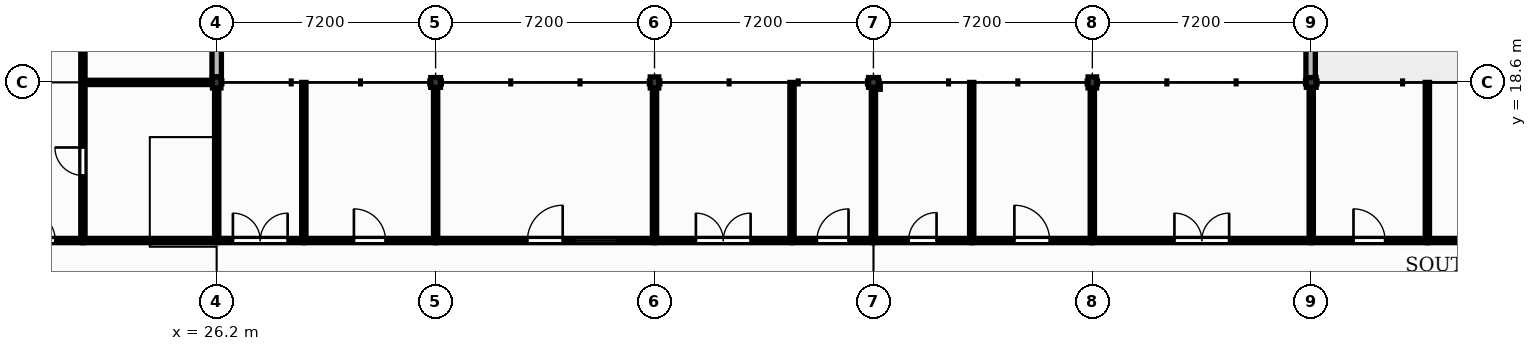
"""IFC4 building model, lengths in metres.
Left out: names, types, materials, properties, quantities, classifications, styles, units other than length and angle.
Written with IfcOpenShell. Run it as: python <this file> out.ifc"""

import sys

from ifc_helpers import new_model, si_unit, direction, frame, frame_2d, origin, origin_2d, place, context, subcontext, project, spatial, polyline, rectangle, outline, extrude, element, fill, save


model = new_model("IFC4")
c1 = context("Model", 3, precision=1e-05, world=origin(), true_north=direction((0.0, 1.0)))
c2 = subcontext(c1, "Body", "Model", "MODEL_VIEW")
j1 = project(units=[si_unit("LENGTHUNIT", "METRE"), si_unit("PLANEANGLEUNIT", "RADIAN")], contexts=[c1])
p1 = place(None, origin())
s1 = spatial("IfcSite", under=j1, at=p1, CompositionType="ELEMENT")
p2 = place(p1, origin())
s2 = spatial("IfcBuilding", under=s1, at=p2, CompositionType="ELEMENT")
p3 = place(p2, frame((0.0, 0.0, 9.0)))
s3 = spatial("IfcBuildingStorey", under=s2, at=p3, CompositionType="ELEMENT", Elevation=9.0)
p4 = place(p3, frame((26.2, 18.6, 0.0), z_axis=(0.0, 0.0, 1.0), x_axis=(1.0, 0.0, 0.0)))
e1 = element("IfcColumn", 1, at=p4, inside=s3, PredefinedType="COLUMN", context=c2, shape_type="SweptSolid", body=[
    extrude(rectangle(XDim=0.28, YDim=0.36, at=origin_2d()), origin(), (0.0, 0.0, 1.0), 3.95),
])
p5 = place(p3, frame((33.4, 18.6, 0.0), z_axis=(0.0, 0.0, 1.0), x_axis=(1.0, 0.0, 0.0)))
e2 = element("IfcColumn", 2, at=p5, inside=s3, PredefinedType="COLUMN", context=c2, shape_type="SweptSolid", body=[
    extrude(rectangle(XDim=0.32, YDim=0.32, at=origin_2d()), origin(), (0.0, 0.0, 1.0), 3.95),
])
p6 = place(p3, frame((40.6, 18.6, 0.0), z_axis=(0.0, 0.0, 1.0), x_axis=(1.0, 0.0, 0.0)))
e3 = element("IfcColumn", 3, at=p6, inside=s3, PredefinedType="COLUMN", context=c2, shape_type="SweptSolid", body=[
    extrude(rectangle(XDim=0.28, YDim=0.36, at=origin_2d()), origin(), (0.0, 0.0, 1.0), 3.95),
])
p7 = place(p3, frame((47.8, 18.6, 0.0), z_axis=(0.0, 0.0, 1.0), x_axis=(1.0, 0.0, 0.0)))
e4 = element("IfcColumn", 4, at=p7, inside=s3, PredefinedType="COLUMN", context=c2, shape_type="SweptSolid", body=[
    extrude(rectangle(XDim=0.32, YDim=0.32, at=origin_2d()), origin(), (0.0, 0.0, 1.0), 3.98),
])
p8 = place(p3, frame((55.0, 18.6, 0.0), z_axis=(0.0, 0.0, 1.0), x_axis=(1.0, 0.0, 0.0)))
e5 = element("IfcColumn", 5, at=p8, inside=s3, PredefinedType="COLUMN", context=c2, shape_type="SweptSolid", body=[
    extrude(rectangle(XDim=0.28, YDim=0.36, at=origin_2d()), origin(), (0.0, 0.0, 1.0), 3.99),
])
p9 = place(p3, frame((62.2, 18.6, 0.0), z_axis=(0.0, 0.0, 1.0), x_axis=(1.0, 0.0, 0.0)))
e6 = element("IfcColumn", 6, at=p9, inside=s3, PredefinedType="COLUMN", context=c2, shape_type="SweptSolid", body=[
    extrude(rectangle(XDim=0.32, YDim=0.32, at=origin_2d()), origin(), (0.0, 0.0, 1.0), 3.99),
])
p10 = place(p3, frame((26.2, 18.78, 0.0), z_axis=(0.0, 0.0, 1.0), x_axis=(0.0, 1.0, 0.0)))
e7 = element("IfcWall", 7, at=p10, inside=s3, PredefinedType="SOLIDWALL", context=c2, shape_type="SweptSolid", body=[
    extrude(rectangle(XDim=8.24, YDim=0.31, at=frame_2d((4.12, 0.0))), origin(), (0.0, 0.0, 1.0), 3.49),
])
p11 = place(p10, frame((0.915, 0.0, 1.0)))
e8 = element("IfcOpeningElement", 8, at=p11, cuts=e7, PredefinedType="OPENING", context=c2, shape_type="SweptSolid", body=[
    extrude(rectangle(XDim=1.24, YDim=1.8, at=frame_2d((0.62, 0.9))), frame((0.0, 0.165, 0.0), z_axis=(0.0, -1.0, 0.0), x_axis=(1.0, 0.0, 0.0)), (0.0, 0.0, 1.0), 0.33),
])
p12 = place(p10, frame((3.515, 0.0, 1.5)))
e9 = element("IfcOpeningElement", 9, at=p12, cuts=e7, PredefinedType="OPENING", context=c2, shape_type="SweptSolid", body=[
    extrude(rectangle(XDim=1.68, YDim=1.25, at=frame_2d((0.84, 0.625))), frame((0.0, 0.165, 0.0), z_axis=(0.0, -1.0, 0.0), x_axis=(1.0, 0.0, 0.0)), (0.0, 0.0, 1.0), 0.33),
])
p13 = place(p10, frame((5.875, 0.0, 1.5)))
e10 = element("IfcOpeningElement", 10, at=p13, cuts=e7, PredefinedType="OPENING", context=c2, shape_type="SweptSolid", body=[
    extrude(rectangle(XDim=1.68, YDim=1.25, at=frame_2d((0.84, 0.625))), frame((0.0, 0.165, 0.0), z_axis=(0.0, -1.0, 0.0), x_axis=(1.0, 0.0, 0.0)), (0.0, 0.0, 1.0), 0.33),
])
p14 = place(p3, frame((62.18, 18.6, 0.0), z_axis=(0.0, 0.0, 1.0), x_axis=(0.0, 1.0, 0.0)))
e11 = element("IfcWall", 11, at=p14, inside=s3, PredefinedType="SOLIDWALL", context=c2, shape_type="SweptSolid", body=[
    extrude(outline(polyline([(0.0, 0.0), (8.6, 0.0), (8.6, 0.05), (4.3, 2.16), (0.0, 0.05), (0.0, 0.0)])), frame((0.0, 0.155, 0.0), z_axis=(0.0, -1.0, 0.0), x_axis=(1.0, 0.0, 0.0)), (0.0, 0.0, 1.0), 0.31),
])
p15 = place(p3, frame((19.0, 13.4, 0.0), z_axis=(0.0, 0.0, 1.0), x_axis=(1.0, 0.0, 0.0)))
e12 = element("IfcWall", 12, at=p15, inside=s3, PredefinedType="PARTITIONING", context=c2, shape_type="SweptSolid", body=[
    extrude(rectangle(XDim=2.8, YDim=0.14, at=frame_2d((1.4, 0.0))), origin(), (0.0, 0.0, 1.0), 3.96),
])
p16 = place(p15, frame((0.91, 0.0, 0.0)))
e13 = element("IfcOpeningElement", 13, at=p16, cuts=e12, PredefinedType="OPENING", context=c2, shape_type="SweptSolid", body=[
    extrude(rectangle(XDim=0.98, YDim=2.15, at=frame_2d((0.49, 1.075))), frame((0.0, 0.08, 0.0), z_axis=(0.0, -1.0, 0.0), x_axis=(1.0, 0.0, 0.0)), (0.0, 0.0, 1.0), 0.16),
])
p17 = place(p3, frame((21.8, 13.47, 0.0), z_axis=(0.0, 0.0, 1.0), x_axis=(0.0, 1.0, 0.0)))
e14 = element("IfcWall", 14, at=p17, inside=s3, PredefinedType="PARTITIONING", context=c2, shape_type="SweptSolid", body=[
    extrude(rectangle(XDim=5.06, YDim=0.14, at=frame_2d((2.53, 0.0))), origin(), (0.0, 0.0, 1.0), 3.91),
])
p18 = place(p17, frame((2.07, 0.0, 0.0)))
e15 = element("IfcOpeningElement", 15, at=p18, cuts=e14, PredefinedType="OPENING", context=c2, shape_type="SweptSolid", body=[
    extrude(rectangle(XDim=0.92, YDim=2.1, at=frame_2d((0.46, 1.05))), frame((0.0, 0.08, 0.0), z_axis=(0.0, -1.0, 0.0), x_axis=(1.0, 0.0, 0.0)), (0.0, 0.0, 1.0), 0.16),
])
p19 = place(p3, frame((21.8, 13.4, 0.0), z_axis=(0.0, 0.0, 1.0), x_axis=(1.0, 0.0, 0.0)))
e16 = element("IfcWall", 16, at=p19, inside=s3, PredefinedType="PARTITIONING", context=c2, shape_type="SweptSolid", body=[
    extrude(rectangle(XDim=4.4, YDim=0.14, at=frame_2d((2.2, 0.0))), origin(), (0.0, 0.0, 1.0), 3.91),
])
p20 = place(p3, frame((21.8, 18.67, 0.0), z_axis=(0.0, 0.0, 1.0), x_axis=(0.0, 1.0, 0.0)))
e17 = element("IfcWall", 17, at=p20, inside=s3, PredefinedType="PARTITIONING", context=c2, shape_type="SweptSolid", body=[
    extrude(rectangle(XDim=2.99, YDim=0.14, at=frame_2d((1.495, 0.0))), origin(), (0.0, 0.0, 1.0), 3.96),
])
p21 = place(p20, frame((0.935, 0.0, 0.0)))
e18 = element("IfcOpeningElement", 18, at=p21, cuts=e17, PredefinedType="OPENING", context=c2, shape_type="SweptSolid", body=[
    extrude(rectangle(XDim=1.12, YDim=2.15, at=frame_2d((0.56, 1.075))), frame((0.0, 0.08, 0.0), z_axis=(0.0, -1.0, 0.0), x_axis=(1.0, 0.0, 0.0)), (0.0, 0.0, 1.0), 0.16),
])
p22 = place(p3, frame((21.8, 18.6, 0.0), z_axis=(0.0, 0.0, 1.0), x_axis=(1.0, 0.0, 0.0)))
e19 = element("IfcWall", 19, at=p22, inside=s3, PredefinedType="PARTITIONING", context=c2, shape_type="SweptSolid", body=[
    extrude(rectangle(XDim=4.26, YDim=0.14, at=frame_2d((2.13, 0.0))), origin(), (0.0, 0.0, 1.0), 3.49),
])
p23 = place(p3, frame((26.2, 13.47, 0.0), z_axis=(0.0, 0.0, 1.0), x_axis=(0.0, 1.0, 0.0)))
e20 = element("IfcWall", 20, at=p23, inside=s3, PredefinedType="PARTITIONING", context=c2, shape_type="SweptSolid", body=[
    extrude(rectangle(XDim=4.95, YDim=0.14, at=frame_2d((2.475, 0.0))), origin(), (0.0, 0.0, 1.0), 3.49),
])
p24 = place(p3, frame((26.2, 13.4, 0.0), z_axis=(0.0, 0.0, 1.0), x_axis=(1.0, 0.0, 0.0)))
e21 = element("IfcWall", 21, at=p24, inside=s3, PredefinedType="PARTITIONING", context=c2, shape_type="SweptSolid", body=[
    extrude(rectangle(XDim=2.866, YDim=0.14, at=frame_2d((1.433, 0.0))), origin(), (0.0, 0.0, 1.0), 3.91),
])
p25 = place(p24, frame((0.533, 0.0, 0.0)))
e22 = element("IfcOpeningElement", 22, at=p25, cuts=e21, PredefinedType="OPENING", context=c2, shape_type="SweptSolid", body=[
    extrude(rectangle(XDim=1.8, YDim=2.3, at=frame_2d((0.9, 1.15))), frame((0.0, 0.08, 0.0), z_axis=(0.0, -1.0, 0.0), x_axis=(1.0, 0.0, 0.0)), (0.0, 0.0, 1.0), 0.16),
])
p26 = place(p3, frame((29.066, 13.47, 0.0), z_axis=(0.0, 0.0, 1.0), x_axis=(0.0, 1.0, 0.0)))
e23 = element("IfcWall", 23, at=p26, inside=s3, PredefinedType="PARTITIONING", context=c2, shape_type="SweptSolid", body=[
    extrude(rectangle(XDim=5.13, YDim=0.14, at=frame_2d((2.565, 0.0))), origin(), (0.0, 0.0, 1.0), 3.91),
])
p27 = place(p3, frame((29.066, 13.4, 0.0), z_axis=(0.0, 0.0, 1.0), x_axis=(1.0, 0.0, 0.0)))
e24 = element("IfcWall", 24, at=p27, inside=s3, PredefinedType="PARTITIONING", context=c2, shape_type="SweptSolid", body=[
    extrude(rectangle(XDim=4.334, YDim=0.14, at=frame_2d((2.167, 0.0))), origin(), (0.0, 0.0, 1.0), 3.91),
])
p28 = place(p27, frame((1.647, 0.0, 0.0)))
e25 = element("IfcOpeningElement", 25, at=p28, cuts=e24, PredefinedType="OPENING", context=c2, shape_type="SweptSolid", body=[
    extrude(rectangle(XDim=1.04, YDim=2.1, at=frame_2d((0.52, 1.05))), frame((0.0, 0.08, 0.0), z_axis=(0.0, -1.0, 0.0), x_axis=(1.0, 0.0, 0.0)), (0.0, 0.0, 1.0), 0.16),
])
p29 = place(p3, frame((33.4, 13.47, 0.0), z_axis=(0.0, 0.0, 1.0), x_axis=(0.0, 1.0, 0.0)))
e26 = element("IfcWall", 26, at=p29, inside=s3, PredefinedType="PARTITIONING", context=c2, shape_type="SweptSolid", body=[
    extrude(rectangle(XDim=4.97, YDim=0.14, at=frame_2d((2.485, 0.0))), origin(), (0.0, 0.0, 1.0), 3.49),
])
p30 = place(p3, frame((33.4, 13.4, 0.0), z_axis=(0.0, 0.0, 1.0), x_axis=(1.0, 0.0, 0.0)))
e27 = element("IfcWall", 27, at=p30, inside=s3, PredefinedType="PARTITIONING", context=c2, shape_type="SweptSolid", body=[
    extrude(rectangle(XDim=7.2, YDim=0.14, at=frame_2d((3.6, 0.0))), origin(), (0.0, 0.0, 1.0), 3.91),
])
p31 = place(p30, frame((3.02, 0.0, 0.0)))
e28 = element("IfcOpeningElement", 28, at=p31, cuts=e27, PredefinedType="OPENING", context=c2, shape_type="SweptSolid", body=[
    extrude(rectangle(XDim=1.16, YDim=2.1, at=frame_2d((0.58, 1.05))), frame((0.0, 0.08, 0.0), z_axis=(0.0, -1.0, 0.0), x_axis=(1.0, 0.0, 0.0)), (0.0, 0.0, 1.0), 0.16),
])
p32 = place(p30, frame((4.58, 0.0, 1.05)))
e29 = element("IfcOpeningElement", 29, at=p32, cuts=e27, PredefinedType="OPENING", context=c2, shape_type="SweptSolid", body=[
    extrude(rectangle(XDim=1.4, YDim=1.1, at=frame_2d((0.7, 0.55))), frame((0.0, 0.08, 0.0), z_axis=(0.0, -1.0, 0.0), x_axis=(1.0, 0.0, 0.0)), (0.0, 0.0, 1.0), 0.16),
])
p33 = place(p3, frame((40.6, 13.47, 0.0), z_axis=(0.0, 0.0, 1.0), x_axis=(0.0, 1.0, 0.0)))
e30 = element("IfcWall", 30, at=p33, inside=s3, PredefinedType="PARTITIONING", context=c2, shape_type="SweptSolid", body=[
    extrude(rectangle(XDim=4.95, YDim=0.14, at=frame_2d((2.475, 0.0))), origin(), (0.0, 0.0, 1.0), 3.49),
])
p34 = place(p3, frame((40.6, 13.4, 0.0), z_axis=(0.0, 0.0, 1.0), x_axis=(1.0, 0.0, 0.0)))
e31 = element("IfcWall", 31, at=p34, inside=s3, PredefinedType="PARTITIONING", context=c2, shape_type="SweptSolid", body=[
    extrude(rectangle(XDim=4.522, YDim=0.14, at=frame_2d((2.261, 0.0))), origin(), (0.0, 0.0, 1.0), 3.91),
])
p35 = place(p34, frame((1.361, 0.0, 0.0)))
e32 = element("IfcOpeningElement", 32, at=p35, cuts=e31, PredefinedType="OPENING", context=c2, shape_type="SweptSolid", body=[
    extrude(rectangle(XDim=1.8, YDim=2.3, at=frame_2d((0.9, 1.15))), frame((0.0, 0.08, 0.0), z_axis=(0.0, -1.0, 0.0), x_axis=(1.0, 0.0, 0.0)), (0.0, 0.0, 1.0), 0.16),
])
p36 = place(p3, frame((45.122, 13.47, 0.0), z_axis=(0.0, 0.0, 1.0), x_axis=(0.0, 1.0, 0.0)))
e33 = element("IfcWall", 33, at=p36, inside=s3, PredefinedType="PARTITIONING", context=c2, shape_type="SweptSolid", body=[
    extrude(rectangle(XDim=5.13, YDim=0.14, at=frame_2d((2.565, 0.0))), origin(), (0.0, 0.0, 1.0), 3.91),
])
p37 = place(p3, frame((45.122, 13.4, 0.0), z_axis=(0.0, 0.0, 1.0), x_axis=(1.0, 0.0, 0.0)))
e34 = element("IfcWall", 34, at=p37, inside=s3, PredefinedType="PARTITIONING", context=c2, shape_type="SweptSolid", body=[
    extrude(rectangle(XDim=2.678, YDim=0.14, at=frame_2d((1.339, 0.0))), origin(), (0.0, 0.0, 1.0), 3.91),
])
p38 = place(p37, frame((0.819, 0.0, 0.0)))
e35 = element("IfcOpeningElement", 35, at=p38, cuts=e34, PredefinedType="OPENING", context=c2, shape_type="SweptSolid", body=[
    extrude(rectangle(XDim=1.04, YDim=2.1, at=frame_2d((0.52, 1.05))), frame((0.0, 0.08, 0.0), z_axis=(0.0, -1.0, 0.0), x_axis=(1.0, 0.0, 0.0)), (0.0, 0.0, 1.0), 0.16),
])
p39 = place(p3, frame((47.8, 13.47, 0.0), z_axis=(0.0, 0.0, 1.0), x_axis=(0.0, 1.0, 0.0)))
e36 = element("IfcWall", 36, at=p39, inside=s3, PredefinedType="PARTITIONING", context=c2, shape_type="SweptSolid", body=[
    extrude(rectangle(XDim=4.97, YDim=0.14, at=frame_2d((2.485, 0.0))), origin(), (0.0, 0.0, 1.0), 3.52),
])
p40 = place(p3, frame((47.8, 13.4, 0.0), z_axis=(0.0, 0.0, 1.0), x_axis=(1.0, 0.0, 0.0)))
e37 = element("IfcWall", 37, at=p40, inside=s3, PredefinedType="PARTITIONING", context=c2, shape_type="SweptSolid", body=[
    extrude(rectangle(XDim=3.233, YDim=0.14, at=frame_2d((1.616, 0.0))), origin(), (0.0, 0.0, 1.0), 3.96),
])
p41 = place(p40, frame((1.156, 0.0, 0.0)))
e38 = element("IfcOpeningElement", 38, at=p41, cuts=e37, PredefinedType="OPENING", context=c2, shape_type="SweptSolid", body=[
    extrude(rectangle(XDim=0.92, YDim=2.1, at=frame_2d((0.46, 1.05))), frame((0.0, 0.08, 0.0), z_axis=(0.0, -1.0, 0.0), x_axis=(1.0, 0.0, 0.0)), (0.0, 0.0, 1.0), 0.16),
])
p42 = place(p3, frame((51.033, 13.47, 0.0), z_axis=(0.0, 0.0, 1.0), x_axis=(0.0, 1.0, 0.0)))
e39 = element("IfcWall", 39, at=p42, inside=s3, PredefinedType="PARTITIONING", context=c2, shape_type="SweptSolid", body=[
    extrude(rectangle(XDim=5.13, YDim=0.14, at=frame_2d((2.565, 0.0))), origin(), (0.0, 0.0, 1.0), 3.96),
])
p43 = place(p3, frame((51.033, 13.4, 0.0), z_axis=(0.0, 0.0, 1.0), x_axis=(1.0, 0.0, 0.0)))
e40 = element("IfcWall", 40, at=p43, inside=s3, PredefinedType="PARTITIONING", context=c2, shape_type="SweptSolid", body=[
    extrude(rectangle(XDim=3.967, YDim=0.14, at=frame_2d((1.983, 0.0))), origin(), (0.0, 0.0, 1.0), 3.96),
])
p44 = place(p43, frame((1.404, 0.0, 0.0)))
e41 = element("IfcOpeningElement", 41, at=p44, cuts=e40, PredefinedType="OPENING", context=c2, shape_type="SweptSolid", body=[
    extrude(rectangle(XDim=1.16, YDim=2.1, at=frame_2d((0.58, 1.05))), frame((0.0, 0.08, 0.0), z_axis=(0.0, -1.0, 0.0), x_axis=(1.0, 0.0, 0.0)), (0.0, 0.0, 1.0), 0.16),
])
p45 = place(p3, frame((55.0, 13.47, 0.0), z_axis=(0.0, 0.0, 1.0), x_axis=(0.0, 1.0, 0.0)))
e42 = element("IfcWall", 42, at=p45, inside=s3, PredefinedType="PARTITIONING", context=c2, shape_type="SweptSolid", body=[
    extrude(rectangle(XDim=4.95, YDim=0.14, at=frame_2d((2.475, 0.0))), origin(), (0.0, 0.0, 1.0), 3.47),
])
p46 = place(p3, frame((55.0, 13.4, 0.0), z_axis=(0.0, 0.0, 1.0), x_axis=(1.0, 0.0, 0.0)))
e43 = element("IfcWall", 43, at=p46, inside=s3, PredefinedType="PARTITIONING", context=c2, shape_type="SweptSolid", body=[
    extrude(rectangle(XDim=7.2, YDim=0.14, at=frame_2d((3.6, 0.0))), origin(), (0.0, 0.0, 1.0), 3.96),
])
p47 = place(p46, frame((2.7, 0.0, 0.0)))
e44 = element("IfcOpeningElement", 44, at=p47, cuts=e43, PredefinedType="OPENING", context=c2, shape_type="SweptSolid", body=[
    extrude(rectangle(XDim=1.8, YDim=2.3, at=frame_2d((0.9, 1.15))), frame((0.0, 0.08, 0.0), z_axis=(0.0, -1.0, 0.0), x_axis=(1.0, 0.0, 0.0)), (0.0, 0.0, 1.0), 0.16),
])
p48 = place(p3, frame((62.2, 13.47, 0.0), z_axis=(0.0, 0.0, 1.0), x_axis=(0.0, 1.0, 0.0)))
e45 = element("IfcWall", 45, at=p48, inside=s3, PredefinedType="PARTITIONING", context=c2, shape_type="SweptSolid", body=[
    extrude(rectangle(XDim=4.97, YDim=0.14, at=frame_2d((2.485, 0.0))), origin(), (0.0, 0.0, 1.0), 3.47),
])
p49 = place(p3, frame((62.2, 13.4, 0.0), z_axis=(0.0, 0.0, 1.0), x_axis=(1.0, 0.0, 0.0)))
e46 = element("IfcWall", 46, at=p49, inside=s3, PredefinedType="PARTITIONING", context=c2, shape_type="SweptSolid", body=[
    extrude(rectangle(XDim=3.819, YDim=0.14, at=frame_2d((1.91, 0.0))), origin(), (0.0, 0.0, 1.0), 3.96),
])
p50 = place(p49, frame((1.389, 0.0, 0.0)))
e47 = element("IfcOpeningElement", 47, at=p50, cuts=e46, PredefinedType="OPENING", context=c2, shape_type="SweptSolid", body=[
    extrude(rectangle(XDim=1.04, YDim=2.1, at=frame_2d((0.52, 1.05))), frame((0.0, 0.08, 0.0), z_axis=(0.0, -1.0, 0.0), x_axis=(1.0, 0.0, 0.0)), (0.0, 0.0, 1.0), 0.16),
])
p51 = place(p3, frame((66.019, 13.47, 0.0), z_axis=(0.0, 0.0, 1.0), x_axis=(0.0, 1.0, 0.0)))
e48 = element("IfcWall", 48, at=p51, inside=s3, PredefinedType="PARTITIONING", context=c2, shape_type="SweptSolid", body=[
    extrude(rectangle(XDim=5.13, YDim=0.14, at=frame_2d((2.565, 0.0))), origin(), (0.0, 0.0, 1.0), 3.96),
])
p52 = place(p3, frame((66.019, 13.4, 0.0), z_axis=(0.0, 0.0, 1.0), x_axis=(1.0, 0.0, 0.0)))
e49 = element("IfcWall", 49, at=p52, inside=s3, PredefinedType="PARTITIONING", context=c2, shape_type="SweptSolid", body=[
    extrude(rectangle(XDim=5.776, YDim=0.14, at=frame_2d((2.888, 0.0))), origin(), (0.0, 0.0, 1.0), 3.96),
])
p53 = place(p52, frame((2.328, 0.0, 0.0)))
e50 = element("IfcOpeningElement", 50, at=p53, cuts=e49, PredefinedType="OPENING", context=c2, shape_type="SweptSolid", body=[
    extrude(rectangle(XDim=1.12, YDim=2.15, at=frame_2d((0.56, 1.075))), frame((0.0, 0.08, 0.0), z_axis=(0.0, -1.0, 0.0), x_axis=(1.0, 0.0, 0.0)), (0.0, 0.0, 1.0), 0.16),
])
p54 = place(p16, origin())
e51 = element("IfcDoor", 51, at=p54, inside=s3, OperationType="SINGLE_SWING_LEFT", PredefinedType="DOOR", context=c2, shape_type="SweptSolid", body=[
    extrude(rectangle(XDim=0.98, YDim=2.15, at=frame_2d((0.49, 1.075))), frame((0.0, 0.025, 0.0), z_axis=(0.0, -1.0, 0.0), x_axis=(1.0, 0.0, 0.0)), (0.0, 0.0, 1.0), 0.05),
])
fill(e13, e51)
p55 = place(p41, origin())
e52 = element("IfcDoor", 52, at=p55, inside=s3, OperationType="SINGLE_SWING_RIGHT", PredefinedType="DOOR", context=c2, shape_type="SweptSolid", body=[
    extrude(rectangle(XDim=0.92, YDim=2.1, at=frame_2d((0.46, 1.05))), frame((0.0, 0.025, 0.0), z_axis=(0.0, -1.0, 0.0), x_axis=(1.0, 0.0, 0.0)), (0.0, 0.0, 1.0), 0.05),
])
fill(e38, e52)
p56 = place(p44, origin())
e53 = element("IfcDoor", 53, at=p56, inside=s3, OperationType="SINGLE_SWING_LEFT", PredefinedType="DOOR", context=c2, shape_type="SweptSolid", body=[
    extrude(rectangle(XDim=1.16, YDim=2.1, at=frame_2d((0.58, 1.05))), frame((0.0, 0.025, 0.0), z_axis=(0.0, -1.0, 0.0), x_axis=(1.0, 0.0, 0.0)), (0.0, 0.0, 1.0), 0.05),
])
fill(e41, e53)
p57 = place(p47, origin())
e54 = element("IfcDoor", 54, at=p57, inside=s3, OperationType="DOUBLE_DOOR_SINGLE_SWING", PredefinedType="DOOR", context=c2, shape_type="SweptSolid", body=[
    extrude(rectangle(XDim=1.8, YDim=2.3, at=frame_2d((0.9, 1.15))), frame((0.0, 0.025, 0.0), z_axis=(0.0, -1.0, 0.0), x_axis=(1.0, 0.0, 0.0)), (0.0, 0.0, 1.0), 0.05),
])
fill(e44, e54)
p58 = place(p50, origin())
e55 = element("IfcDoor", 55, at=p58, inside=s3, OperationType="SINGLE_SWING_LEFT", PredefinedType="DOOR", context=c2, shape_type="SweptSolid", body=[
    extrude(rectangle(XDim=1.04, YDim=2.1, at=frame_2d((0.52, 1.05))), frame((0.0, 0.025, 0.0), z_axis=(0.0, -1.0, 0.0), x_axis=(1.0, 0.0, 0.0)), (0.0, 0.0, 1.0), 0.05),
])
fill(e47, e55)
p59 = place(p18, origin())
e56 = element("IfcDoor", 56, at=p59, inside=s3, OperationType="SINGLE_SWING_RIGHT", PredefinedType="DOOR", context=c2, shape_type="SweptSolid", body=[
    extrude(rectangle(XDim=0.92, YDim=2.1, at=frame_2d((0.46, 1.05))), frame((0.0, 0.025, 0.0), z_axis=(0.0, -1.0, 0.0), x_axis=(1.0, 0.0, 0.0)), (0.0, 0.0, 1.0), 0.05),
])
fill(e15, e56)
p60 = place(p25, origin())
e57 = element("IfcDoor", 57, at=p60, inside=s3, OperationType="DOUBLE_DOOR_SINGLE_SWING", PredefinedType="DOOR", context=c2, shape_type="SweptSolid", body=[
    extrude(rectangle(XDim=1.8, YDim=2.3, at=frame_2d((0.9, 1.15))), frame((0.0, 0.025, 0.0), z_axis=(0.0, -1.0, 0.0), x_axis=(1.0, 0.0, 0.0)), (0.0, 0.0, 1.0), 0.05),
])
fill(e22, e57)
p61 = place(p28, origin())
e58 = element("IfcDoor", 58, at=p61, inside=s3, OperationType="SINGLE_SWING_LEFT", PredefinedType="DOOR", context=c2, shape_type="SweptSolid", body=[
    extrude(rectangle(XDim=1.04, YDim=2.1, at=frame_2d((0.52, 1.05))), frame((0.0, 0.025, 0.0), z_axis=(0.0, -1.0, 0.0), x_axis=(1.0, 0.0, 0.0)), (0.0, 0.0, 1.0), 0.05),
])
fill(e25, e58)
p62 = place(p31, origin())
e59 = element("IfcDoor", 59, at=p62, inside=s3, OperationType="SINGLE_SWING_RIGHT", PredefinedType="DOOR", context=c2, shape_type="SweptSolid", body=[
    extrude(rectangle(XDim=1.16, YDim=2.1, at=frame_2d((0.58, 1.05))), frame((0.0, 0.025, 0.0), z_axis=(0.0, -1.0, 0.0), x_axis=(1.0, 0.0, 0.0)), (0.0, 0.0, 1.0), 0.05),
])
fill(e28, e59)
p63 = place(p32, origin())
e60 = element("IfcWindow", 60, at=p63, inside=s3, PartitioningType="SINGLE_PANEL", PredefinedType="WINDOW", context=c2, shape_type="SweptSolid", body=[
    extrude(rectangle(XDim=1.4, YDim=1.1, at=frame_2d((0.7, 0.55))), frame((0.0, 0.03, 0.0), z_axis=(0.0, -1.0, 0.0), x_axis=(1.0, 0.0, 0.0)), (0.0, 0.0, 1.0), 0.06),
])
fill(e29, e60)
p64 = place(p35, origin())
e61 = element("IfcDoor", 61, at=p64, inside=s3, OperationType="DOUBLE_DOOR_SINGLE_SWING", PredefinedType="DOOR", context=c2, shape_type="SweptSolid", body=[
    extrude(rectangle(XDim=1.8, YDim=2.3, at=frame_2d((0.9, 1.15))), frame((0.0, 0.025, 0.0), z_axis=(0.0, -1.0, 0.0), x_axis=(1.0, 0.0, 0.0)), (0.0, 0.0, 1.0), 0.05),
])
fill(e32, e61)
p65 = place(p38, origin())
e62 = element("IfcDoor", 62, at=p65, inside=s3, OperationType="SINGLE_SWING_RIGHT", PredefinedType="DOOR", context=c2, shape_type="SweptSolid", body=[
    extrude(rectangle(XDim=1.04, YDim=2.1, at=frame_2d((0.52, 1.05))), frame((0.0, 0.025, 0.0), z_axis=(0.0, -1.0, 0.0), x_axis=(1.0, 0.0, 0.0)), (0.0, 0.0, 1.0), 0.05),
])
fill(e35, e62)
save(model, sys.argv[1])
